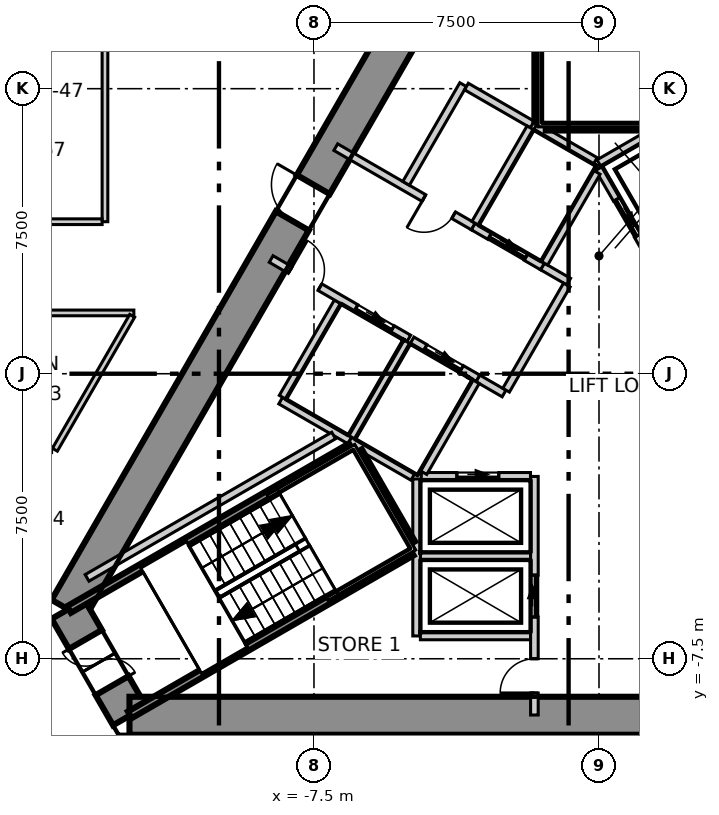
"""IFC4 building model, lengths in metres.
Left out: names, types, materials, properties, quantities, classifications, styles, units other than length and angle.
Written with IfcOpenShell. Run it as: python <this file> out.ifc"""

import sys

from ifc_helpers import new_model, si_unit, direction, frame, frame_2d, origin, place, context, subcontext, project, spatial, polyline, rectangle, outline, extrude, element, fill, save


model = new_model("IFC4")
c1 = context("Model", 3, precision=1e-05, world=origin(), true_north=direction((0.0, 1.0)))
c2 = subcontext(c1, "Body", "Model", "MODEL_VIEW")
j1 = project(units=[si_unit("LENGTHUNIT", "METRE"), si_unit("PLANEANGLEUNIT", "RADIAN")], contexts=[c1])
p1 = place(None, origin())
s1 = spatial("IfcSite", under=j1, at=p1, CompositionType="ELEMENT")
p2 = place(p1, origin())
s2 = spatial("IfcBuilding", under=s1, at=p2, CompositionType="ELEMENT")
p3 = place(p2, frame((0.0, 0.0, 8.5)))
s3 = spatial("IfcBuildingStorey", under=s2, at=p3, CompositionType="ELEMENT", Elevation=8.5)
p4 = place(p3, frame((-1.617, 15.2, -0.4), z_axis=(0.0, 0.0, 1.0), x_axis=(-0.499992141631, -0.866029940768, 0.0)))
e1 = element("IfcWall", 1, at=p4, inside=s3, PredefinedType="SHEAR", context=c2, shape_type="SweptSolid", body=[
    extrude(outline(polyline([(-0.289, -0.499), (1.656, -0.499), (3.601, -0.499), (5.547, -0.499), (7.492, -0.499), (9.437, -0.5), (11.382, -0.5), (13.328, -0.5), (15.273, -0.5), (17.218, -0.5), (19.163, -0.5), (21.109, -0.5), (23.054, -0.5), (24.999, -0.5), (24.422, 0.5), (22.566, 0.5), (20.709, 0.5), (18.853, 0.5), (16.997, 0.5), (15.14, 0.5), (13.284, 0.5), (11.427, 0.5), (9.571, 0.5), (7.715, 0.5), (5.858, 0.5), (4.002, 0.5), (2.146, 0.5), (0.289, 0.5), (-0.289, -0.499)])), origin(), (0.0, 0.0, 1.0), 6.0),
])
p5 = place(p4, frame((11.805, 0.0, 0.4)))
e2 = element("IfcOpeningElement", 2, at=p5, cuts=e1, PredefinedType="OPENING", context=c2, shape_type="SweptSolid", body=[
    extrude(rectangle(XDim=1.1, YDim=2.1, at=frame_2d((0.55, 1.05))), frame((0.0, 0.51, 0.0), z_axis=(0.0, -1.0, 0.0), x_axis=(1.0, 0.0, 0.0)), (0.0, 0.0, 1.0), 1.02),
])
p6 = place(p3, frame((-13.972, -6.2, -0.4), z_axis=(0.0, 0.0, 1.0), x_axis=(0.500077567175, -0.865980615723, 0.0)))
e3 = element("IfcWall", 3, at=p6, inside=s3, PredefinedType="SHEAR", context=c2, shape_type="SweptSolid", body=[
    extrude(outline(polyline([(-0.289, -0.5), (1.616, -0.5), (3.522, -0.5), (2.944, 0.499), (1.617, 0.5), (0.289, 0.5), (-0.289, -0.5)])), origin(), (0.0, 0.0, 1.0), 6.0),
])
p7 = place(p6, frame((0.917, 0.0, 0.4)))
e4 = element("IfcOpeningElement", 4, at=p7, cuts=e3, PredefinedType="OPENING", context=c2, shape_type="SweptSolid", body=[
    extrude(rectangle(XDim=1.4, YDim=2.1, at=frame_2d((0.7, 1.05))), frame((0.0, 0.51, 0.0), z_axis=(0.0, -1.0, 0.0), x_axis=(1.0, 0.0, 0.0)), (0.0, 0.0, 1.0), 1.02),
])
p8 = place(p3, frame((-12.355, -9.0, -0.4), z_axis=(0.0, 0.0, 1.0), x_axis=(1.0, 0.0, 0.0)))
e5 = element("IfcWall", 5, at=p8, inside=s3, PredefinedType="SHEAR", context=c2, shape_type="SweptSolid", body=[
    extrude(outline(polyline([(-0.289, -0.5), (1.656, -0.5), (3.601, -0.5), (5.547, -0.5), (7.492, -0.5), (9.437, -0.5), (11.382, -0.5), (13.328, -0.5), (15.273, -0.5), (17.218, -0.5), (19.163, -0.5), (21.109, -0.5), (23.054, -0.5), (24.999, -0.5), (24.422, 0.5), (22.566, 0.5), (20.709, 0.5), (18.853, 0.5), (16.996, 0.5), (15.14, 0.5), (13.283, 0.5), (11.427, 0.5), (9.57, 0.5), (7.714, 0.5), (5.857, 0.5), (4.001, 0.5), (2.145, 0.5), (0.288, 0.5), (-0.289, -0.5)])), origin(), (0.0, 0.0, 1.0), 6.0),
])
p9 = place(p3, frame((-22.315, 1.6, 0.0), z_axis=(0.0, 0.0, 1.0), x_axis=(1.0, 0.0, 0.0)))
e6 = element("IfcWall", 6, at=p9, inside=s3, PredefinedType="PARTITIONING", context=c2, shape_type="SweptSolid", body=[
    extrude(rectangle(XDim=10.075, YDim=0.15, at=frame_2d((5.038, 0.0))), origin(), (0.0, 0.0, 1.0), 5.6),
])
p10 = place(p9, frame((4.494, 0.0, 0.0)))
e7 = element("IfcOpeningElement", 7, at=p10, cuts=e6, PredefinedType="OPENING", context=c2, shape_type="SweptSolid", body=[
    extrude(rectangle(XDim=1.0, YDim=2.1, at=frame_2d((0.5, 1.05))), frame((0.0, 0.085, 0.0), z_axis=(0.0, -1.0, 0.0), x_axis=(1.0, 0.0, 0.0)), (0.0, 0.0, 1.0), 0.17),
])
p11 = place(p3, frame((-14.318, -2.0, 0.0), z_axis=(0.0, 0.0, 1.0), x_axis=(0.500009753642, 0.866019772443, 0.0)))
e8 = element("IfcWall", 8, at=p11, inside=s3, PredefinedType="PARTITIONING", context=c2, shape_type="SweptSolid", body=[
    extrude(rectangle(XDim=4.07, YDim=0.15, at=frame_2d((2.035, 0.0))), origin(), (0.0, 0.0, 1.0), 5.6),
])
p12 = place(p3, frame((-13.0, 4.0, 0.0), z_axis=(0.0, 0.0, 1.0), x_axis=(0.0, 1.0, 0.0)))
e9 = element("IfcWall", 9, at=p12, inside=s3, PredefinedType="PARTITIONING", context=c2, shape_type="SweptSolid", body=[
    extrude(rectangle(XDim=9.083, YDim=0.15, at=frame_2d((4.542, 0.0))), origin(), (0.0, 0.0, 1.0), 5.6),
])
p13 = place(p3, frame((-18.244, 4.0, 0.0), z_axis=(0.0, 0.0, 1.0), x_axis=(0.499999792389, 0.866025523649, 0.0)))
e10 = element("IfcWall", 10, at=p13, inside=s3, PredefinedType="PARTITIONING", context=c2, shape_type="SweptSolid", body=[
    extrude(rectangle(XDim=10.338, YDim=0.15, at=frame_2d((5.169, 0.0))), origin(), (0.0, 0.0, 1.0), 5.6),
])
p14 = place(p13, frame((4.744, 0.0, 0.0)))
e11 = element("IfcOpeningElement", 11, at=p14, cuts=e10, PredefinedType="OPENING", context=c2, shape_type="SweptSolid", body=[
    extrude(rectangle(XDim=1.0, YDim=2.1, at=frame_2d((0.5, 1.05))), frame((0.0, 0.085, 0.0), z_axis=(0.0, -1.0, 0.0), x_axis=(1.0, 0.0, 0.0)), (0.0, 0.0, 1.0), 0.17),
])
p15 = place(p3, frame((-18.158, 4.0, 0.0), z_axis=(0.0, 0.0, 1.0), x_axis=(1.0, 0.0, 0.0)))
e12 = element("IfcWall", 12, at=p15, inside=s3, PredefinedType="PARTITIONING", context=c2, shape_type="SweptSolid", body=[
    extrude(rectangle(XDim=5.083, YDim=0.15, at=frame_2d((2.542, 0.0))), origin(), (0.0, 0.0, 1.0), 5.6),
])
p16 = place(p3, frame((-8.376, -0.707, 0.0), z_axis=(0.0, 0.0, 1.0), x_axis=(0.866067520717, -0.499927044236, 0.0)))
e13 = element("IfcWall", 13, at=p16, inside=s3, PredefinedType="SOLIDWALL", context=c2, shape_type="SweptSolid", body=[
    extrude(rectangle(XDim=2.1, YDim=0.2, at=frame_2d((1.05, 0.0))), origin(), (0.0, 0.0, 1.0), 5.6),
])
p17 = place(p3, frame((-8.326, -0.62, 0.0), z_axis=(0.0, 0.0, 1.0), x_axis=(0.500023687443, 0.866011727401, 0.0)))
e14 = element("IfcWall", 14, at=p17, inside=s3, PredefinedType="SOLIDWALL", context=c2, shape_type="SweptSolid", body=[
    extrude(rectangle(XDim=2.9, YDim=0.2, at=frame_2d((1.45, 0.0))), origin(), (0.0, 0.0, 1.0), 5.6),
])
p18 = place(p3, frame((-4.7, -4.8, 0.0), z_axis=(0.0, 0.0, 1.0), x_axis=(1.0, 0.0, 0.0)))
e15 = element("IfcWall", 15, at=p18, inside=s3, PredefinedType="SOLIDWALL", context=c2, shape_type="SweptSolid", body=[
    extrude(rectangle(XDim=2.9, YDim=0.2, at=frame_2d((1.45, 0.0))), origin(), (0.0, 0.0, 1.0), 5.6),
])
p19 = place(p3, frame((-4.8, -6.9, 0.0), z_axis=(0.0, 0.0, 1.0), x_axis=(0.0, 1.0, 0.0)))
e16 = element("IfcWall", 16, at=p19, inside=s3, PredefinedType="SOLIDWALL", context=c2, shape_type="SweptSolid", body=[
    extrude(rectangle(XDim=4.131, YDim=0.2, at=frame_2d((2.065, 0.0))), origin(), (0.0, 0.0, 1.0), 5.6),
])
p20 = place(p3, frame((-4.7, -6.9, 0.0), z_axis=(0.0, 0.0, 1.0), x_axis=(1.0, 0.0, 0.0)))
e17 = element("IfcWall", 17, at=p20, inside=s3, PredefinedType="SOLIDWALL", context=c2, shape_type="SweptSolid", body=[
    extrude(rectangle(XDim=2.9, YDim=0.2, at=frame_2d((1.45, 0.0))), origin(), (0.0, 0.0, 1.0), 5.6),
])
p21 = place(p3, frame((-1.7, -8.98, 0.0), z_axis=(0.0, 0.0, 1.0), x_axis=(0.0, 1.0, 0.0)))
e18 = element("IfcWall", 18, at=p21, inside=s3, PredefinedType="SOLIDWALL", context=c2, shape_type="SweptSolid", body=[
    extrude(rectangle(XDim=6.277, YDim=0.2, at=frame_2d((3.139, 0.0))), origin(), (0.0, 0.0, 1.0), 5.6),
])
p22 = place(p21, frame((2.58, 0.0, 0.0)))
e19 = element("IfcOpeningElement", 19, at=p22, cuts=e18, PredefinedType="OPENING", context=c2, shape_type="SweptSolid", body=[
    extrude(rectangle(XDim=1.1, YDim=2.1, at=frame_2d((0.55, 1.05))), frame((0.0, 0.11, 0.0), z_axis=(0.0, -1.0, 0.0), x_axis=(1.0, 0.0, 0.0)), (0.0, 0.0, 1.0), 0.22),
])
p23 = place(p21, frame((0.58, 0.0, 0.0)))
e20 = element("IfcOpeningElement", 20, at=p23, cuts=e18, PredefinedType="OPENING", context=c2, shape_type="SweptSolid", body=[
    extrude(rectangle(XDim=0.9, YDim=2.1, at=frame_2d((0.45, 1.05))), frame((0.0, 0.11, 0.0), z_axis=(0.0, -1.0, 0.0), x_axis=(1.0, 0.0, 0.0)), (0.0, 0.0, 1.0), 0.22),
])
p24 = place(p3, frame((-4.676, -2.7, 0.0), z_axis=(0.0, 0.0, 1.0), x_axis=(1.0, 0.0, 0.0)))
e21 = element("IfcWall", 21, at=p24, inside=s3, PredefinedType="SOLIDWALL", context=c2, shape_type="SweptSolid", body=[
    extrude(rectangle(XDim=2.873, YDim=0.2, at=frame_2d((1.437, 0.0))), origin(), (0.0, 0.0, 1.0), 5.6),
])
p25 = place(p24, frame((0.937, 0.0, 0.0)))
e22 = element("IfcOpeningElement", 22, at=p25, cuts=e21, PredefinedType="OPENING", context=c2, shape_type="SweptSolid", body=[
    extrude(rectangle(XDim=1.1, YDim=2.1, at=frame_2d((0.55, 1.05))), frame((0.0, 0.11, 0.0), z_axis=(0.0, -1.0, 0.0), x_axis=(1.0, 0.0, 0.0)), (0.0, 0.0, 1.0), 0.22),
])
p26 = place(p3, frame((-0.002, 5.541, 0.0), z_axis=(0.0, 0.0, 1.0), x_axis=(0.86600155993, 0.500041296494, 0.0)))
e23 = element("IfcWall", 23, at=p26, inside=s3, PredefinedType="SOLIDWALL", context=c2, shape_type="SweptSolid", body=[
    extrude(rectangle(XDim=4.132, YDim=0.2, at=frame_2d((2.066, 0.0))), origin(), (0.0, 0.0, 1.0), 5.6),
])
p27 = place(p3, frame((0.0, 5.4, 0.0), z_axis=(0.0, 0.0, 1.0), x_axis=(0.500103862429, -0.865965430478, 0.0)))
e24 = element("IfcWall", 24, at=p27, inside=s3, PredefinedType="SOLIDWALL", context=c2, shape_type="SweptSolid", body=[
    extrude(rectangle(XDim=2.973, YDim=0.2, at=frame_2d((1.487, 0.0))), origin(), (0.0, 0.0, 1.0), 5.6),
])
p28 = place(p27, frame((0.937, 0.0, 0.0)))
e25 = element("IfcOpeningElement", 25, at=p28, cuts=e24, PredefinedType="OPENING", context=c2, shape_type="SweptSolid", body=[
    extrude(rectangle(XDim=1.1, YDim=2.1, at=frame_2d((0.55, 1.05))), frame((0.0, 0.11, 0.0), z_axis=(0.0, -1.0, 0.0), x_axis=(1.0, 0.0, 0.0)), (0.0, 0.0, 1.0), 0.22),
])
p29 = place(p3, frame((-8.627, 3.018, 0.0), z_axis=(0.0, 0.0, 1.0), x_axis=(0.866039775641, -0.499975106388, 0.0)))
e26 = element("IfcWall", 26, at=p29, inside=s3, PredefinedType="SOLIDWALL", context=c2, shape_type="SweptSolid", body=[
    extrude(rectangle(XDim=4.182, YDim=0.2, at=frame_2d((2.091, 0.0))), origin(), (0.0, 0.0, 1.0), 5.6),
])
p30 = place(p29, frame((2.58, 0.0, 0.0)))
e27 = element("IfcOpeningElement", 27, at=p30, cuts=e26, PredefinedType="OPENING", context=c2, shape_type="SweptSolid", body=[
    extrude(rectangle(XDim=1.1, YDim=2.1, at=frame_2d((0.55, 1.05))), frame((0.0, 0.11, 0.0), z_axis=(0.0, -1.0, 0.0), x_axis=(1.0, 0.0, 0.0)), (0.0, 0.0, 1.0), 0.22),
])
p31 = place(p29, frame((0.58, 0.0, 0.0)))
e28 = element("IfcOpeningElement", 28, at=p31, cuts=e26, PredefinedType="OPENING", context=c2, shape_type="SweptSolid", body=[
    extrude(rectangle(XDim=0.9, YDim=2.1, at=frame_2d((0.45, 1.05))), frame((0.0, 0.11, 0.0), z_axis=(0.0, -1.0, 0.0), x_axis=(1.0, 0.0, 0.0)), (0.0, 0.0, 1.0), 0.22),
])
p32 = place(p3, frame((-3.188, -0.122, 0.0), z_axis=(0.0, 0.0, 1.0), x_axis=(0.865705793592, -0.50055317294, 0.0)))
e29 = element("IfcWall", 29, at=p32, inside=s3, PredefinedType="SOLIDWALL", context=c2, shape_type="SweptSolid", body=[
    extrude(rectangle(XDim=0.797, YDim=0.2, at=frame_2d((0.398, 0.0))), origin(), (0.0, 0.0, 1.0), 5.6),
])
p33 = place(p3, frame((-6.927, 5.962, 0.0), z_axis=(0.0, 0.0, 1.0), x_axis=(0.866065051207, -0.49993132236, 0.0)))
e30 = element("IfcWall", 30, at=p33, inside=s3, PredefinedType="SOLIDWALL", context=c2, shape_type="SweptSolid", body=[
    extrude(rectangle(XDim=4.182, YDim=0.2, at=frame_2d((2.091, 0.0))), origin(), (0.0, 0.0, 1.0), 5.6),
])
p34 = place(p33, frame((2.68, 0.0, 0.0)))
e31 = element("IfcOpeningElement", 31, at=p34, cuts=e30, PredefinedType="OPENING", context=c2, shape_type="SweptSolid", body=[
    extrude(rectangle(XDim=0.9, YDim=2.1, at=frame_2d((0.45, 1.05))), frame((0.0, 0.11, 0.0), z_axis=(0.0, -1.0, 0.0), x_axis=(1.0, 0.0, 0.0)), (0.0, 0.0, 1.0), 0.22),
])
p35 = place(p3, frame((-1.488, 2.822, 0.0), z_axis=(0.0, 0.0, 1.0), x_axis=(0.866236612152, -0.499633997809, 0.0)))
e32 = element("IfcWall", 32, at=p35, inside=s3, PredefinedType="SOLIDWALL", context=c2, shape_type="SweptSolid", body=[
    extrude(rectangle(XDim=0.796, YDim=0.2, at=frame_2d((0.398, 0.0))), origin(), (0.0, 0.0, 1.0), 5.6),
])
p36 = place(p3, frame((-5.076, 5.009, 0.0), z_axis=(0.0, 0.0, 1.0), x_axis=(0.50002537861, 0.866010750942, 0.0)))
e33 = element("IfcWall", 33, at=p36, inside=s3, PredefinedType="SOLIDWALL", context=c2, shape_type="SweptSolid", body=[
    extrude(rectangle(XDim=3.0, YDim=0.2, at=frame_2d((1.5, 0.0))), origin(), (0.0, 0.0, 1.0), 5.6),
])
p37 = place(p3, frame((-3.489, 7.557, 0.0), z_axis=(0.0, 0.0, 1.0), x_axis=(0.866010750942, -0.50002537861, 0.0)))
e34 = element("IfcWall", 34, at=p37, inside=s3, PredefinedType="SOLIDWALL", context=c2, shape_type="SweptSolid", body=[
    extrude(rectangle(XDim=2.0, YDim=0.2, at=frame_2d((1.0, 0.0))), origin(), (0.0, 0.0, 1.0), 5.6),
])
p38 = place(p3, frame((-2.444, -0.433, 0.0), z_axis=(0.0, 0.0, 1.0), x_axis=(0.500035624827, 0.866004834804, 0.0)))
e35 = element("IfcWall", 35, at=p38, inside=s3, PredefinedType="SOLIDWALL", context=c2, shape_type="SweptSolid", body=[
    extrude(rectangle(XDim=3.194, YDim=0.2, at=frame_2d((1.597, 0.0))), origin(), (0.0, 0.0, 1.0), 5.6),
])
p39 = place(p3, frame((-6.557, -1.757, 0.0), z_axis=(0.0, 0.0, 1.0), x_axis=(0.8659754619, -0.500086491905, 0.0)))
e36 = element("IfcWall", 36, at=p39, inside=s3, PredefinedType="SOLIDWALL", context=c2, shape_type="SweptSolid", body=[
    extrude(rectangle(XDim=1.916, YDim=0.2, at=frame_2d((0.958, 0.0))), origin(), (0.0, 0.0, 1.0), 5.6),
])
p40 = place(p3, frame((-6.507, -1.67, 0.0), z_axis=(0.0, 0.0, 1.0), x_axis=(0.50012328804, 0.865954211699, 0.0)))
e37 = element("IfcWall", 37, at=p40, inside=s3, PredefinedType="SOLIDWALL", context=c2, shape_type="SweptSolid", body=[
    extrude(rectangle(XDim=2.9, YDim=0.2, at=frame_2d((1.45, 0.0))), origin(), (0.0, 0.0, 1.0), 5.6),
])
p41 = place(p3, frame((-4.92, 0.878, 0.0), z_axis=(0.0, 0.0, 1.0), x_axis=(0.866010750942, -0.50002537861, 0.0)))
e38 = element("IfcWall", 38, at=p41, inside=s3, PredefinedType="SOLIDWALL", context=c2, shape_type="SweptSolid", body=[
    extrude(rectangle(XDim=2.0, YDim=0.2, at=frame_2d((1.0, 0.0))), origin(), (0.0, 0.0, 1.0), 5.6),
])
p42 = place(p41, frame((0.4, 0.0, 0.0)))
e39 = element("IfcOpeningElement", 39, at=p42, cuts=e38, PredefinedType="OPENING", context=c2, shape_type="SweptSolid", body=[
    extrude(rectangle(XDim=1.1, YDim=2.1, at=frame_2d((0.55, 1.05))), frame((0.0, 0.11, 0.0), z_axis=(0.0, -1.0, 0.0), x_axis=(1.0, 0.0, 0.0)), (0.0, 0.0, 1.0), 0.22),
])
p43 = place(p3, frame((-4.619, -2.6, 0.0), z_axis=(0.0, 0.0, 1.0), x_axis=(0.50009492287, 0.865970593103, 0.0)))
e40 = element("IfcWall", 40, at=p43, inside=s3, PredefinedType="SOLIDWALL", context=c2, shape_type="SweptSolid", body=[
    extrude(rectangle(XDim=2.761, YDim=0.2, at=frame_2d((1.381, 0.0))), origin(), (0.0, 0.0, 1.0), 5.6),
])
p44 = place(p3, frame((-3.309, 3.873, 0.0), z_axis=(0.0, 0.0, 1.0), x_axis=(0.866098583652, -0.499873227325, 0.0)))
e41 = element("IfcWall", 41, at=p44, inside=s3, PredefinedType="SOLIDWALL", context=c2, shape_type="SweptSolid", body=[
    extrude(rectangle(XDim=2.103, YDim=0.2, at=frame_2d((1.051, 0.0))), origin(), (0.0, 0.0, 1.0), 5.6),
])
p45 = place(p44, frame((0.502, 0.0, 0.0)))
e42 = element("IfcOpeningElement", 42, at=p45, cuts=e41, PredefinedType="OPENING", context=c2, shape_type="SweptSolid", body=[
    extrude(rectangle(XDim=1.1, YDim=2.1, at=frame_2d((0.55, 1.05))), frame((0.0, 0.11, 0.0), z_axis=(0.0, -1.0, 0.0), x_axis=(1.0, 0.0, 0.0)), (0.0, 0.0, 1.0), 0.22),
])
p46 = place(p3, frame((-3.257, 3.959, 0.0), z_axis=(0.0, 0.0, 1.0), x_axis=(0.50012328804, 0.865954211699, 0.0)))
e43 = element("IfcWall", 43, at=p46, inside=s3, PredefinedType="SOLIDWALL", context=c2, shape_type="SweptSolid", body=[
    extrude(rectangle(XDim=2.9, YDim=0.2, at=frame_2d((1.45, 0.0))), origin(), (0.0, 0.0, 1.0), 5.6),
])
p47 = place(p3, frame((-1.67, 6.507, 0.0), z_axis=(0.0, 0.0, 1.0), x_axis=(0.865941441609, -0.500145398563, 0.0)))
e44 = element("IfcWall", 44, at=p47, inside=s3, PredefinedType="SOLIDWALL", context=c2, shape_type="SweptSolid", body=[
    extrude(rectangle(XDim=1.815, YDim=0.2, at=frame_2d((0.908, 0.0))), origin(), (0.0, 0.0, 1.0), 5.6),
])
p48 = place(p3, frame((-1.438, 2.909, 0.0), z_axis=(0.0, 0.0, 1.0), x_axis=(0.499829630636, 0.866123744241, 0.0)))
e45 = element("IfcWall", 45, at=p48, inside=s3, PredefinedType="SOLIDWALL", context=c2, shape_type="SweptSolid", body=[
    extrude(rectangle(XDim=2.761, YDim=0.2, at=frame_2d((1.38, 0.0))), origin(), (0.0, 0.0, 1.0), 5.6),
])
p49 = place(p3, frame((-13.471, -5.372, 0.0), z_axis=(0.0, 0.0, 1.0), x_axis=(0.866012469592, 0.50002240201, 0.0)))
e46 = element("IfcWall", 46, at=p49, inside=s3, PredefinedType="SOLIDWALL", context=c2, shape_type="SweptSolid", body=[
    extrude(rectangle(XDim=7.492, YDim=0.2, at=frame_2d((3.746, 0.0))), origin(), (0.0, 0.0, 1.0), 5.6),
])
p50 = place(p3, frame((-13.946, -6.204, 0.0), z_axis=(0.0, 0.0, 1.0), x_axis=(0.866036527536, 0.499980732602, 0.0)))
e47 = element("IfcWall", 47, at=p50, inside=s3, PredefinedType="SOLIDWALL", context=c2, shape_type="SweptSolid", body=[
    extrude(rectangle(XDim=8.564, YDim=0.2, at=frame_2d((4.282, 0.0))), origin(), (0.0, 0.0, 1.0), 5.6),
])
p51 = place(p3, frame((-6.329, -2.038, 0.0), z_axis=(0.0, 0.0, 1.0), x_axis=(0.500200581029, -0.865909567298, 0.0)))
e48 = element("IfcWall", 48, at=p51, inside=s3, PredefinedType="SOLIDWALL", context=c2, shape_type="SweptSolid", body=[
    extrude(rectangle(XDim=2.799, YDim=0.2, at=frame_2d((1.399, 0.0))), origin(), (0.0, 0.0, 1.0), 5.6),
])
p52 = place(p3, frame((-12.346, -8.976, 0.0), z_axis=(0.0, 0.0, 1.0), x_axis=(0.865987152174, 0.50006624788, 0.0)))
e49 = element("IfcWall", 49, at=p52, inside=s3, PredefinedType="SOLIDWALL", context=c2, shape_type="SweptSolid", body=[
    extrude(rectangle(XDim=8.565, YDim=0.2, at=frame_2d((4.282, 0.0))), origin(), (0.0, 0.0, 1.0), 5.6),
])
p53 = place(p3, frame((-1.4, 6.5, 0.0), z_axis=(0.0, 0.0, 1.0), x_axis=(1.0, 0.0, 0.0)))
e50 = element("IfcWall", 50, at=p53, inside=s3, PredefinedType="SOLIDWALL", context=c2, shape_type="SweptSolid", body=[
    extrude(rectangle(XDim=2.8, YDim=0.2, at=frame_2d((1.4, 0.0))), origin(), (0.0, 0.0, 1.0), 5.6),
])
p54 = place(p3, frame((-1.6, 6.615, 0.0), z_axis=(0.0, 0.0, 1.0), x_axis=(0.0, 1.0, 0.0)))
e51 = element("IfcWall", 51, at=p54, inside=s3, PredefinedType="SOLIDWALL", context=c2, shape_type="SweptSolid", body=[
    extrude(rectangle(XDim=8.565, YDim=0.2, at=frame_2d((4.282, 0.0))), origin(), (0.0, 0.0, 1.0), 5.6),
])
p55 = place(p25, origin())
e52 = element("IfcDoor", 52, at=p55, inside=s3, OperationType="SLIDING_TO_LEFT", PredefinedType="DOOR", context=c2, shape_type="SweptSolid", body=[
    extrude(rectangle(XDim=1.1, YDim=2.1, at=frame_2d((0.55, 1.05))), frame((0.0, 0.025, 0.0), z_axis=(0.0, -1.0, 0.0), x_axis=(1.0, 0.0, 0.0)), (0.0, 0.0, 1.0), 0.05),
])
fill(e22, e52)
p56 = place(p22, origin())
e53 = element("IfcDoor", 53, at=p56, inside=s3, OperationType="SLIDING_TO_LEFT", PredefinedType="DOOR", context=c2, shape_type="SweptSolid", body=[
    extrude(rectangle(XDim=1.1, YDim=2.1, at=frame_2d((0.55, 1.05))), frame((0.0, 0.025, 0.0), z_axis=(0.0, -1.0, 0.0), x_axis=(1.0, 0.0, 0.0)), (0.0, 0.0, 1.0), 0.05),
])
fill(e19, e53)
p57 = place(p28, origin())
e54 = element("IfcDoor", 54, at=p57, inside=s3, OperationType="SLIDING_TO_LEFT", PredefinedType="DOOR", context=c2, shape_type="SweptSolid", body=[
    extrude(rectangle(XDim=1.1, YDim=2.1, at=frame_2d((0.55, 1.05))), frame((0.0, 0.025, 0.0), z_axis=(0.0, -1.0, 0.0), x_axis=(1.0, 0.0, 0.0)), (0.0, 0.0, 1.0), 0.05),
])
fill(e25, e54)
p58 = place(p42, origin())
e55 = element("IfcDoor", 55, at=p58, inside=s3, OperationType="SLIDING_TO_LEFT", PredefinedType="DOOR", context=c2, shape_type="SweptSolid", body=[
    extrude(rectangle(XDim=1.1, YDim=2.1, at=frame_2d((0.55, 1.05))), frame((0.0, 0.025, 0.0), z_axis=(0.0, -1.0, 0.0), x_axis=(1.0, 0.0, 0.0)), (0.0, 0.0, 1.0), 0.05),
])
fill(e39, e55)
p59 = place(p45, origin())
e56 = element("IfcDoor", 56, at=p59, inside=s3, OperationType="SLIDING_TO_LEFT", PredefinedType="DOOR", context=c2, shape_type="SweptSolid", body=[
    extrude(rectangle(XDim=1.1, YDim=2.1, at=frame_2d((0.55, 1.05))), frame((0.0, 0.025, 0.0), z_axis=(0.0, -1.0, 0.0), x_axis=(1.0, 0.0, 0.0)), (0.0, 0.0, 1.0), 0.05),
])
fill(e42, e56)
p60 = place(p30, origin())
e57 = element("IfcDoor", 57, at=p60, inside=s3, OperationType="SLIDING_TO_LEFT", PredefinedType="DOOR", context=c2, shape_type="SweptSolid", body=[
    extrude(rectangle(XDim=1.1, YDim=2.1, at=frame_2d((0.55, 1.05))), frame((0.0, 0.025, 0.0), z_axis=(0.0, -1.0, 0.0), x_axis=(1.0, 0.0, 0.0)), (0.0, 0.0, 1.0), 0.05),
])
fill(e27, e57)
p61 = place(p34, origin())
e58 = element("IfcDoor", 58, at=p61, inside=s3, OperationType="SINGLE_SWING_LEFT", PredefinedType="DOOR", context=c2, shape_type="SweptSolid", body=[
    extrude(rectangle(XDim=0.9, YDim=2.1, at=frame_2d((0.45, 1.05))), frame((0.0, 0.025, 0.0), z_axis=(0.0, -1.0, 0.0), x_axis=(1.0, 0.0, 0.0)), (0.0, 0.0, 1.0), 0.05),
])
fill(e31, e58)
p62 = place(p7, origin())
e59 = element("IfcDoor", 59, at=p62, inside=s3, OperationType="DOUBLE_DOOR_SINGLE_SWING", PredefinedType="DOOR", context=c2, shape_type="SweptSolid", body=[
    extrude(rectangle(XDim=1.4, YDim=2.1, at=frame_2d((0.7, 1.05))), frame((0.0, 0.025, 0.0), z_axis=(0.0, -1.0, 0.0), x_axis=(1.0, 0.0, 0.0)), (0.0, 0.0, 1.0), 0.05),
])
fill(e4, e59)
p63 = place(p5, origin())
e60 = element("IfcDoor", 60, at=p63, inside=s3, OperationType="SINGLE_SWING_LEFT", PredefinedType="DOOR", context=c2, shape_type="SweptSolid", body=[
    extrude(rectangle(XDim=1.1, YDim=2.1, at=frame_2d((0.55, 1.05))), frame((0.0, 0.025, 0.0), z_axis=(0.0, -1.0, 0.0), x_axis=(1.0, 0.0, 0.0)), (0.0, 0.0, 1.0), 0.05),
])
fill(e2, e60)
p64 = place(p31, origin())
e61 = element("IfcDoor", 61, at=p64, inside=s3, OperationType="SINGLE_SWING_RIGHT", PredefinedType="DOOR", context=c2, shape_type="SweptSolid", body=[
    extrude(rectangle(XDim=0.9, YDim=2.1, at=frame_2d((0.45, 1.05))), frame((0.0, 0.025, 0.0), z_axis=(0.0, -1.0, 0.0), x_axis=(1.0, 0.0, 0.0)), (0.0, 0.0, 1.0), 0.05),
])
fill(e28, e61)
p65 = place(p23, origin())
e62 = element("IfcDoor", 62, at=p65, inside=s3, OperationType="SINGLE_SWING_RIGHT", PredefinedType="DOOR", context=c2, shape_type="SweptSolid", body=[
    extrude(rectangle(XDim=0.9, YDim=2.1, at=frame_2d((0.45, 1.05))), frame((0.0, 0.025, 0.0), z_axis=(0.0, -1.0, 0.0), x_axis=(1.0, 0.0, 0.0)), (0.0, 0.0, 1.0), 0.05),
])
fill(e20, e62)
save(model, sys.argv[1])
